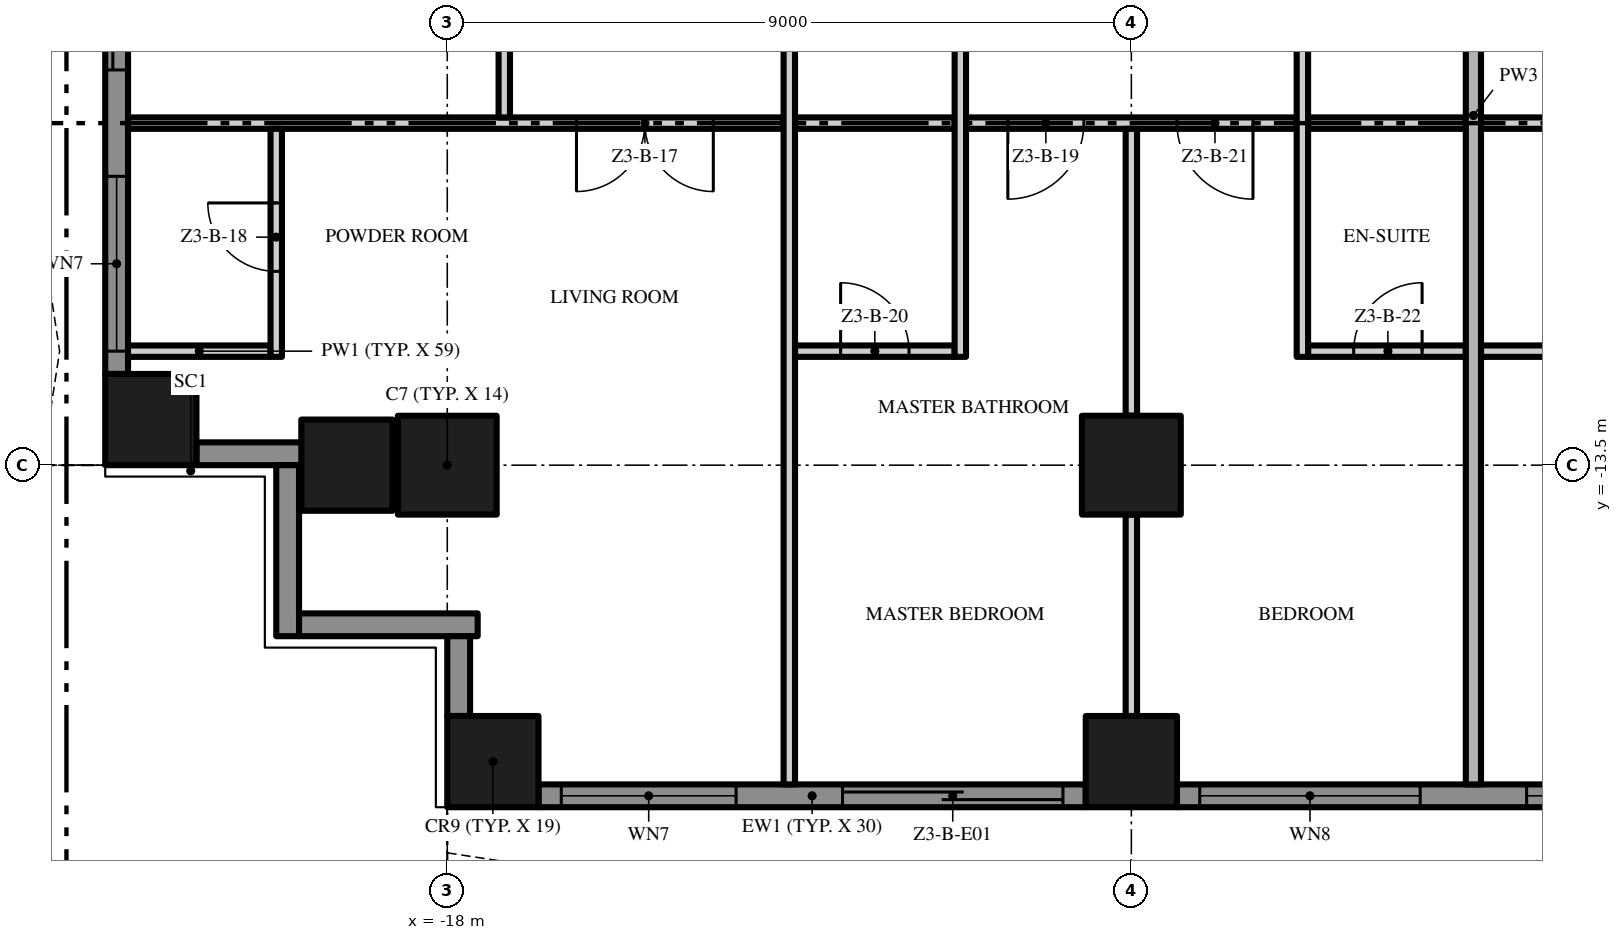
"""IFC4 building model, lengths in metres.
Left out: names, types, materials, properties, quantities, classifications, styles, units other than length and angle.
Written with IfcOpenShell. Run it as: python <this file> out.ifc"""

import sys

from ifc_helpers import new_model, si_unit, direction, frame, frame_2d, origin, origin_2d, place, context, subcontext, project, spatial, polyline, rectangle, outline, extrude, element, fill, save


model = new_model("IFC4")
c1 = context("Model", 3, precision=1e-05, world=origin(), true_north=direction((0.0, 1.0)))
c2 = subcontext(c1, "Body", "Model", "MODEL_VIEW")
j1 = project(units=[si_unit("LENGTHUNIT", "METRE"), si_unit("PLANEANGLEUNIT", "RADIAN")], contexts=[c1])
p1 = place(None, origin())
s1 = spatial("IfcSite", under=j1, at=p1, CompositionType="ELEMENT")
p2 = place(p1, origin())
s2 = spatial("IfcBuilding", under=s1, at=p2, CompositionType="ELEMENT")
p3 = place(p2, frame((0.0, 0.0, 136.4)))
s3 = spatial("IfcBuildingStorey", under=s2, at=p3, CompositionType="ELEMENT", Elevation=136.4)
p4 = place(p3, frame((-18.0, -13.5, 0.0), z_axis=(0.0, 0.0, 1.0), x_axis=(1.0, 0.0, 0.0)))
e1 = element("IfcColumn", 1, at=p4, inside=s3, PredefinedType="COLUMN", context=c2, shape_type="SweptSolid", body=[
    extrude(rectangle(XDim=1.3, YDim=1.3, at=origin_2d()), origin(), (0.0, 0.0, 1.0), 3.5),
])
for number, where, z_axis, x_axis in (
    (2, (-17.4, -17.4, 0.0), (0.0, 0.0, 1.0), (1.0, 0.0, 0.0)),
    (3, (-21.9, -12.9, 0.0), (0.0, 0.0, 1.0), (1.0, 0.0, 0.0)),
    (4, (-19.32, -13.5, 0.0), (0.0, 0.0, 1.0), (1.0, 0.0, 0.0)),
):
    element("IfcColumn", number, at=place(p3, frame(where, z_axis=z_axis, x_axis=x_axis)), inside=s3, PredefinedType="COLUMN", context=c2, shape_type="SweptSolid", body=[
        extrude(rectangle(XDim=1.2, YDim=1.2, at=origin_2d()), origin(), (0.0, 0.0, 1.0), 3.5),
    ])
p5 = place(p3, frame((-9.0, -13.5, 0.0), z_axis=(0.0, 0.0, 1.0), x_axis=(1.0, 0.0, 0.0)))
e5 = element("IfcColumn", 5, at=p5, inside=s3, PredefinedType="COLUMN", context=c2, shape_type="SweptSolid", body=[
    extrude(rectangle(XDim=1.3, YDim=1.3, at=origin_2d()), origin(), (0.0, 0.0, 1.0), 3.5),
])
p6 = place(p3, frame((-9.0, -17.4, 0.0), z_axis=(0.0, 0.0, 1.0), x_axis=(1.0, 0.0, 0.0)))
e6 = element("IfcColumn", 6, at=p6, inside=s3, PredefinedType="COLUMN", context=c2, shape_type="SweptSolid", body=[
    extrude(rectangle(XDim=1.2, YDim=1.2, at=origin_2d()), origin(), (0.0, 0.0, 1.0), 3.5),
])
p7 = place(p3, frame((-9.6, -17.85, 0.0), z_axis=(0.0, 0.0, 1.0), x_axis=(-1.0, 0.0, 0.0)))
e7 = element("IfcWall", 7, at=p7, inside=s3, PredefinedType="SOLIDWALL", context=c2, shape_type="SweptSolid", body=[
    extrude(rectangle(XDim=7.2, YDim=0.3, at=frame_2d((3.6, 0.0))), origin(), (0.0, 0.0, 1.0), 3.5),
])
p8 = place(p7, frame((4.6, 0.0, 0.45)))
e8 = element("IfcOpeningElement", 8, at=p8, cuts=e7, PredefinedType="OPENING", context=c2, shape_type="SweptSolid", body=[
    extrude(rectangle(XDim=2.3, YDim=2.65, at=frame_2d((1.15, 1.325))), frame((0.0, 0.16, 0.0), z_axis=(0.0, -1.0, 0.0), x_axis=(1.0, 0.0, 0.0)), (0.0, 0.0, 1.0), 0.32),
])
p9 = place(p7, frame((0.3, 0.0, 0.0)))
e9 = element("IfcOpeningElement", 9, at=p9, cuts=e7, PredefinedType="OPENING", context=c2, shape_type="SweptSolid", body=[
    extrude(rectangle(XDim=2.9, YDim=2.4, at=frame_2d((1.45, 1.2))), frame((0.0, 0.16, 0.0), z_axis=(0.0, -1.0, 0.0), x_axis=(1.0, 0.0, 0.0)), (0.0, 0.0, 1.0), 0.32),
])
p10 = place(p3, frame((-0.6, -17.85, 0.0), z_axis=(0.0, 0.0, 1.0), x_axis=(-1.0, 0.0, 0.0)))
e10 = element("IfcWall", 10, at=p10, inside=s3, PredefinedType="SOLIDWALL", context=c2, shape_type="SweptSolid", body=[
    extrude(rectangle(XDim=7.8, YDim=0.3, at=frame_2d((3.9, 0.0))), origin(), (0.0, 0.0, 1.0), 3.5),
])
p11 = place(p10, frame((4.6, 0.0, 0.45)))
e11 = element("IfcOpeningElement", 11, at=p11, cuts=e10, PredefinedType="OPENING", context=c2, shape_type="SweptSolid", body=[
    extrude(rectangle(XDim=2.9, YDim=2.65, at=frame_2d((1.45, 1.325))), frame((0.0, 0.16, 0.0), z_axis=(0.0, -1.0, 0.0), x_axis=(1.0, 0.0, 0.0)), (0.0, 0.0, 1.0), 0.32),
])
p12 = place(p10, frame((0.3, 0.0, 0.45)))
e12 = element("IfcOpeningElement", 12, at=p12, cuts=e10, PredefinedType="OPENING", context=c2, shape_type="SweptSolid", body=[
    extrude(rectangle(XDim=2.9, YDim=2.65, at=frame_2d((1.45, 1.325))), frame((0.0, 0.16, 0.0), z_axis=(0.0, -1.0, 0.0), x_axis=(1.0, 0.0, 0.0)), (0.0, 0.0, 1.0), 0.32),
])
p13 = place(p3, frame((-22.35, -12.3, 0.0), z_axis=(0.0, 0.0, 1.0), x_axis=(0.0, 1.0, 0.0)))
e13 = element("IfcWall", 13, at=p13, inside=s3, PredefinedType="SOLIDWALL", context=c2, shape_type="SweptSolid", body=[
    extrude(rectangle(XDim=7.2, YDim=0.3, at=frame_2d((3.6, 0.0))), origin(), (0.0, 0.0, 1.0), 3.5),
])
p14 = place(p13, frame((4.0, 0.0, 0.0)))
e14 = element("IfcOpeningElement", 14, at=p14, cuts=e13, PredefinedType="OPENING", context=c2, shape_type="SweptSolid", body=[
    extrude(rectangle(XDim=2.9, YDim=2.4, at=frame_2d((1.45, 1.2))), frame((0.0, 0.16, 0.0), z_axis=(0.0, -1.0, 0.0), x_axis=(1.0, 0.0, 0.0)), (0.0, 0.0, 1.0), 0.32),
])
p15 = place(p13, frame((0.3, 0.0, 0.45)))
e15 = element("IfcOpeningElement", 15, at=p15, cuts=e13, PredefinedType="OPENING", context=c2, shape_type="SweptSolid", body=[
    extrude(rectangle(XDim=2.3, YDim=2.65, at=frame_2d((1.15, 1.325))), frame((0.0, 0.16, 0.0), z_axis=(0.0, -1.0, 0.0), x_axis=(1.0, 0.0, 0.0)), (0.0, 0.0, 1.0), 0.32),
])
p16 = place(p3, frame((-19.85, -13.35, 0.0), z_axis=(0.0, 0.0, 1.0), x_axis=(-1.0, 0.0, 0.0)))
e16 = element("IfcWall", 16, at=p16, inside=s3, PredefinedType="SOLIDWALL", context=c2, shape_type="SweptSolid", body=[
    extrude(rectangle(XDim=1.45, YDim=0.3, at=frame_2d((0.725, 0.0))), origin(), (0.0, 0.0, 1.0), 3.5),
])
p17 = place(p3, frame((-20.1, -15.75, 0.0), z_axis=(0.0, 0.0, 1.0), x_axis=(0.0, 1.0, 0.0)))
e17 = element("IfcWall", 17, at=p17, inside=s3, PredefinedType="SOLIDWALL", context=c2, shape_type="SweptSolid", body=[
    extrude(rectangle(XDim=2.25, YDim=0.3, at=frame_2d((1.125, 0.0))), origin(), (0.0, 0.0, 1.0), 3.5),
])
p18 = place(p3, frame((-17.6, -15.6, 0.0), z_axis=(0.0, 0.0, 1.0), x_axis=(-1.0, 0.0, 0.0)))
e18 = element("IfcWall", 18, at=p18, inside=s3, PredefinedType="SOLIDWALL", context=c2, shape_type="SweptSolid", body=[
    extrude(rectangle(XDim=2.35, YDim=0.3, at=frame_2d((1.175, 0.0))), origin(), (0.0, 0.0, 1.0), 3.5),
])
p19 = place(p3, frame((-17.85, -16.8, 0.0), z_axis=(0.0, 0.0, 1.0), x_axis=(0.0, 1.0, 0.0)))
e19 = element("IfcWall", 19, at=p19, inside=s3, PredefinedType="SOLIDWALL", context=c2, shape_type="SweptSolid", body=[
    extrude(rectangle(XDim=1.05, YDim=0.3, at=frame_2d((0.525, 0.0))), origin(), (0.0, 0.0, 1.0), 3.5),
])
p20 = place(p3, origin())
e20 = element("IfcWall", 20, at=p20, inside=s3, PredefinedType="USERDEFINED", context=c2, shape_type="SweptSolid", body=[
    extrude(outline(polyline([(-18.0, -18.6), (-16.5, -18.829), (-15.0, -19.429), (-13.5, -20.171), (-12.0, -20.771), (-10.5, -21.0), (-9.0, -20.771), (-7.5, -20.171), (-6.0, -19.429), (-4.5, -18.829), (-3.0, -18.6), (-1.5, -18.829), (0.0, -19.429), (1.5, -20.171), (3.0, -20.771), (4.5, -21.0), (6.0, -20.771), (7.5, -20.171), (9.0, -19.429), (10.5, -18.829), (12.0, -18.6), (13.5, -18.829), (15.0, -19.429), (16.5, -20.171), (18.0, -20.771), (18.093, -20.539), (16.602, -19.942), (15.102, -19.201), (13.566, -18.586), (12.0, -18.347), (10.434, -18.586), (8.898, -19.201), (7.398, -19.942), (5.934, -20.528), (4.5, -20.747), (3.066, -20.528), (1.602, -19.942), (0.102, -19.201), (-1.434, -18.586), (-3.0, -18.347), (-4.566, -18.586), (-6.102, -19.201), (-7.602, -19.942), (-9.066, -20.528), (-10.5, -20.747), (-11.934, -20.528), (-13.398, -19.942), (-14.898, -19.201), (-16.434, -18.586), (-17.962, -18.353), (-18.0, -18.6)])), origin(), (0.0, 0.0, 1.0), 0.9),
])
p21 = place(p3, origin())
e21 = element("IfcWall", 21, at=p21, inside=s3, PredefinedType="USERDEFINED", context=c2, shape_type="SweptSolid", body=[
    extrude(outline(polyline([(-23.1, 18.0), (-23.329, 16.5), (-23.929, 15.0), (-24.671, 13.5), (-25.271, 12.0), (-25.5, 10.5), (-25.271, 9.0), (-24.671, 7.5), (-23.929, 6.0), (-23.329, 4.5), (-23.1, 3.0), (-23.329, 1.5), (-23.929, 0.0), (-24.671, -1.5), (-25.271, -3.0), (-25.5, -4.5), (-25.271, -6.0), (-24.671, -7.5), (-23.929, -9.0), (-23.329, -10.5), (-23.1, -12.0), (-23.329, -13.5), (-23.082, -13.538), (-22.847, -12.0), (-23.086, -10.434), (-23.701, -8.898), (-24.442, -7.398), (-25.028, -5.934), (-25.247, -4.5), (-25.028, -3.066), (-24.442, -1.602), (-23.701, -0.102), (-23.086, 1.434), (-22.847, 3.0), (-23.086, 4.566), (-23.701, 6.102), (-24.442, 7.602), (-25.028, 9.066), (-25.247, 10.5), (-25.028, 11.934), (-24.442, 13.398), (-23.701, 14.898), (-23.086, 16.434), (-22.853, 17.962), (-23.1, 18.0)])), origin(), (0.0, 0.0, 1.0), 0.9),
])
p22 = place(p3, frame((-22.2, -12.0, 0.0), z_axis=(0.0, 0.0, 1.0), x_axis=(1.0, 0.0, 0.0)))
e22 = element("IfcWall", 22, at=p22, inside=s3, PredefinedType="PARTITIONING", context=c2, shape_type="SweptSolid", body=[
    extrude(rectangle(XDim=1.875, YDim=0.15, at=frame_2d((0.938, 0.0))), origin(), (0.0, 0.0, 1.0), 3.5),
])
p23 = place(p3, frame((-13.425, -12.0, 0.0), z_axis=(0.0, 0.0, 1.0), x_axis=(1.0, 0.0, 0.0)))
e23 = element("IfcWall", 23, at=p23, inside=s3, PredefinedType="PARTITIONING", context=c2, shape_type="SweptSolid", body=[
    extrude(rectangle(XDim=2.1, YDim=0.15, at=frame_2d((1.05, 0.0))), origin(), (0.0, 0.0, 1.0), 3.5),
])
p24 = place(p23, frame((0.6, 0.0, 0.0)))
e24 = element("IfcOpeningElement", 24, at=p24, cuts=e23, PredefinedType="OPENING", context=c2, shape_type="SweptSolid", body=[
    extrude(rectangle(XDim=0.9, YDim=2.1, at=frame_2d((0.45, 1.05))), frame((0.0, 0.085, 0.0), z_axis=(0.0, -1.0, 0.0), x_axis=(1.0, 0.0, 0.0)), (0.0, 0.0, 1.0), 0.17),
])
p25 = place(p3, frame((-6.675, -12.0, 0.0), z_axis=(0.0, 0.0, 1.0), x_axis=(1.0, 0.0, 0.0)))
e25 = element("IfcWall", 25, at=p25, inside=s3, PredefinedType="PARTITIONING", context=c2, shape_type="SweptSolid", body=[
    extrude(rectangle(XDim=2.075, YDim=0.15, at=frame_2d((1.038, 0.0))), origin(), (0.0, 0.0, 1.0), 3.5),
])
p26 = place(p25, frame((0.6, 0.0, 0.0)))
e26 = element("IfcOpeningElement", 26, at=p26, cuts=e25, PredefinedType="OPENING", context=c2, shape_type="SweptSolid", body=[
    extrude(rectangle(XDim=0.9, YDim=2.1, at=frame_2d((0.45, 1.05))), frame((0.0, 0.085, 0.0), z_axis=(0.0, -1.0, 0.0), x_axis=(1.0, 0.0, 0.0)), (0.0, 0.0, 1.0), 0.17),
])
p27 = place(p3, frame((-4.4, -12.0, 0.0), z_axis=(0.0, 0.0, 1.0), x_axis=(1.0, 0.0, 0.0)))
e27 = element("IfcWall", 27, at=p27, inside=s3, PredefinedType="PARTITIONING", context=c2, shape_type="SweptSolid", body=[
    extrude(rectangle(XDim=2.075, YDim=0.15, at=frame_2d((1.038, 0.0))), origin(), (0.0, 0.0, 1.0), 3.5),
])
p28 = place(p3, frame((-13.575, -9.0, 0.0), z_axis=(0.0, 0.0, 1.0), x_axis=(-1.0, 0.0, 0.0)))
e28 = element("IfcWall", 28, at=p28, inside=s3, PredefinedType="PARTITIONING", context=c2, shape_type="SweptSolid", body=[
    extrude(rectangle(XDim=8.625, YDim=0.15, at=frame_2d((4.312, 0.0))), origin(), (0.0, 0.0, 1.0), 3.5),
])
p29 = place(p28, frame((0.925, 0.0, 0.0)))
e29 = element("IfcOpeningElement", 29, at=p29, cuts=e28, PredefinedType="OPENING", context=c2, shape_type="SweptSolid", body=[
    extrude(rectangle(XDim=1.8, YDim=2.4, at=frame_2d((0.9, 1.2))), frame((0.0, 0.085, 0.0), z_axis=(0.0, -1.0, 0.0), x_axis=(1.0, 0.0, 0.0)), (0.0, 0.0, 1.0), 0.17),
])
p30 = place(p3, frame((-13.425, -9.0, 0.0), z_axis=(0.0, 0.0, 1.0), x_axis=(1.0, 0.0, 0.0)))
e30 = element("IfcWall", 30, at=p30, inside=s3, PredefinedType="PARTITIONING", context=c2, shape_type="SweptSolid", body=[
    extrude(rectangle(XDim=2.1, YDim=0.15, at=frame_2d((1.05, 0.0))), origin(), (0.0, 0.0, 1.0), 3.5),
])
p31 = place(p3, frame((-6.825, -9.0, 0.0), z_axis=(0.0, 0.0, 1.0), x_axis=(-1.0, 0.0, 0.0)))
e31 = element("IfcWall", 31, at=p31, inside=s3, PredefinedType="PARTITIONING", context=c2, shape_type="SweptSolid", body=[
    extrude(rectangle(XDim=4.35, YDim=0.15, at=frame_2d((2.175, 0.0))), origin(), (0.0, 0.0, 1.0), 3.5),
])
p32 = place(p31, frame((2.8, 0.0, 0.0)))
e32 = element("IfcOpeningElement", 32, at=p32, cuts=e31, PredefinedType="OPENING", context=c2, shape_type="SweptSolid", body=[
    extrude(rectangle(XDim=1.0, YDim=2.4, at=frame_2d((0.5, 1.2))), frame((0.0, 0.085, 0.0), z_axis=(0.0, -1.0, 0.0), x_axis=(1.0, 0.0, 0.0)), (0.0, 0.0, 1.0), 0.17),
])
p33 = place(p31, frame((0.575, 0.0, 0.0)))
e33 = element("IfcOpeningElement", 33, at=p33, cuts=e31, PredefinedType="OPENING", context=c2, shape_type="SweptSolid", body=[
    extrude(rectangle(XDim=1.0, YDim=2.4, at=frame_2d((0.5, 1.2))), frame((0.0, 0.085, 0.0), z_axis=(0.0, -1.0, 0.0), x_axis=(1.0, 0.0, 0.0)), (0.0, 0.0, 1.0), 0.17),
])
for number, where, z_axis, x_axis in (
    (34, (-6.675, -9.0, 0.0), (0.0, 0.0, 1.0), (1.0, 0.0, 0.0)),
    (35, (-4.4, -9.0, 0.0), (0.0, 0.0, 1.0), (1.0, 0.0, 0.0)),
):
    element("IfcWall", number, at=place(p3, frame(where, z_axis=z_axis, x_axis=x_axis)), inside=s3, PredefinedType="PARTITIONING", context=c2, shape_type="SweptSolid", body=[
        extrude(rectangle(XDim=2.075, YDim=0.15, at=frame_2d((1.038, 0.0))), origin(), (0.0, 0.0, 1.0), 3.5),
    ])
p34 = place(p3, frame((-20.25, -12.075, 0.0), z_axis=(0.0, 0.0, 1.0), x_axis=(0.0, 1.0, 0.0)))
e36 = element("IfcWall", 36, at=p34, inside=s3, PredefinedType="PARTITIONING", context=c2, shape_type="SweptSolid", body=[
    extrude(rectangle(XDim=3.0, YDim=0.15, at=frame_2d((1.5, 0.0))), origin(), (0.0, 0.0, 1.0), 3.5),
])
p35 = place(p34, frame((1.125, 0.0, 0.0)))
e37 = element("IfcOpeningElement", 37, at=p35, cuts=e36, PredefinedType="OPENING", context=c2, shape_type="SweptSolid", body=[
    extrude(rectangle(XDim=0.9, YDim=2.1, at=frame_2d((0.45, 1.05))), frame((0.0, 0.085, 0.0), z_axis=(0.0, -1.0, 0.0), x_axis=(1.0, 0.0, 0.0)), (0.0, 0.0, 1.0), 0.17),
])
p36 = place(p3, frame((-17.25, -8.925, 0.0), z_axis=(0.0, 0.0, 1.0), x_axis=(0.0, 1.0, 0.0)))
e38 = element("IfcWall", 38, at=p36, inside=s3, PredefinedType="PARTITIONING", context=c2, shape_type="SweptSolid", body=[
    extrude(rectangle(XDim=4.5, YDim=0.15, at=frame_2d((2.25, 0.0))), origin(), (0.0, 0.0, 1.0), 3.5),
])
p37 = place(p3, frame((-13.5, -4.425, 0.0), z_axis=(0.0, 0.0, 1.0), x_axis=(0.0, -1.0, 0.0)))
e39 = element("IfcWall", 39, at=p37, inside=s3, PredefinedType="PARTITIONING", context=c2, shape_type="SweptSolid", body=[
    extrude(rectangle(XDim=13.275, YDim=0.15, at=frame_2d((6.638, 0.0))), origin(), (0.0, 0.0, 1.0), 3.5),
])
p38 = place(p37, frame((1.875, 0.0, 0.0)))
e40 = element("IfcOpeningElement", 40, at=p38, cuts=e39, PredefinedType="OPENING", context=c2, shape_type="SweptSolid", body=[
    extrude(rectangle(XDim=0.9, YDim=2.1, at=frame_2d((0.45, 1.05))), frame((0.0, 0.085, 0.0), z_axis=(0.0, -1.0, 0.0), x_axis=(1.0, 0.0, 0.0)), (0.0, 0.0, 1.0), 0.17),
])
p39 = place(p3, frame((-11.25, -12.075, 0.0), z_axis=(0.0, 0.0, 1.0), x_axis=(0.0, 1.0, 0.0)))
e41 = element("IfcWall", 41, at=p39, inside=s3, PredefinedType="PARTITIONING", context=c2, shape_type="SweptSolid", body=[
    extrude(rectangle(XDim=7.65, YDim=0.15, at=frame_2d((3.825, 0.0))), origin(), (0.0, 0.0, 1.0), 3.5),
])
p40 = place(p3, frame((-9.0, -16.8, 0.0), z_axis=(0.0, 0.0, 1.0), x_axis=(0.0, 1.0, 0.0)))
e42 = element("IfcWall", 42, at=p40, inside=s3, PredefinedType="PARTITIONING", context=c2, shape_type="SweptSolid", body=[
    extrude(rectangle(XDim=2.65, YDim=0.15, at=frame_2d((1.325, 0.0))), origin(), (0.0, 0.0, 1.0), 3.5),
])
p41 = place(p3, frame((-9.0, -12.85, 0.0), z_axis=(0.0, 0.0, 1.0), x_axis=(0.0, 1.0, 0.0)))
e43 = element("IfcWall", 43, at=p41, inside=s3, PredefinedType="PARTITIONING", context=c2, shape_type="SweptSolid", body=[
    extrude(rectangle(XDim=3.775, YDim=0.15, at=frame_2d((1.887, 0.0))), origin(), (0.0, 0.0, 1.0), 3.5),
])
p42 = place(p3, frame((-6.75, -12.075, 0.0), z_axis=(0.0, 0.0, 1.0), x_axis=(0.0, 1.0, 0.0)))
e44 = element("IfcWall", 44, at=p42, inside=s3, PredefinedType="PARTITIONING", context=c2, shape_type="SweptSolid", body=[
    extrude(rectangle(XDim=7.65, YDim=0.15, at=frame_2d((3.825, 0.0))), origin(), (0.0, 0.0, 1.0), 3.5),
])
p43 = place(p3, frame((-4.5, -17.7, 0.0), z_axis=(0.0, 0.0, 1.0), x_axis=(0.0, 1.0, 0.0)))
e45 = element("IfcWall", 45, at=p43, inside=s3, PredefinedType="PARTITIONING", context=c2, shape_type="SweptSolid", body=[
    extrude(rectangle(XDim=17.6, YDim=0.2, at=frame_2d((8.8, 0.0))), origin(), (0.0, 0.0, 1.0), 3.5),
])
p44 = place(p8, origin())
e46 = element("IfcWindow", 46, at=p44, inside=s3, PartitioningType="SINGLE_PANEL", PredefinedType="WINDOW", context=c2, shape_type="SweptSolid", body=[
    extrude(rectangle(XDim=2.3, YDim=2.65, at=frame_2d((1.15, 1.325))), frame((0.0, 0.03, 0.0), z_axis=(0.0, -1.0, 0.0), x_axis=(1.0, 0.0, 0.0)), (0.0, 0.0, 1.0), 0.06),
])
fill(e8, e46)
p45 = place(p9, origin())
e47 = element("IfcDoor", 47, at=p45, inside=s3, OperationType="SINGLE_SWING_LEFT", PredefinedType="DOOR", context=c2, shape_type="SweptSolid", body=[
    extrude(rectangle(XDim=2.9, YDim=2.4, at=frame_2d((1.45, 1.2))), frame((0.0, 0.025, 0.0), z_axis=(0.0, -1.0, 0.0), x_axis=(1.0, 0.0, 0.0)), (0.0, 0.0, 1.0), 0.05),
])
fill(e9, e47)
p46 = place(p11, origin())
e48 = element("IfcWindow", 48, at=p46, inside=s3, PartitioningType="SINGLE_PANEL", PredefinedType="WINDOW", context=c2, shape_type="SweptSolid", body=[
    extrude(rectangle(XDim=2.9, YDim=2.65, at=frame_2d((1.45, 1.325))), frame((0.0, 0.03, 0.0), z_axis=(0.0, -1.0, 0.0), x_axis=(1.0, 0.0, 0.0)), (0.0, 0.0, 1.0), 0.06),
])
fill(e11, e48)
p47 = place(p12, origin())
e49 = element("IfcWindow", 49, at=p47, inside=s3, PartitioningType="SINGLE_PANEL", PredefinedType="WINDOW", context=c2, shape_type="SweptSolid", body=[
    extrude(rectangle(XDim=2.9, YDim=2.65, at=frame_2d((1.45, 1.325))), frame((0.0, 0.03, 0.0), z_axis=(0.0, -1.0, 0.0), x_axis=(1.0, 0.0, 0.0)), (0.0, 0.0, 1.0), 0.06),
])
fill(e12, e49)
p48 = place(p14, origin())
e50 = element("IfcDoor", 50, at=p48, inside=s3, OperationType="SINGLE_SWING_LEFT", PredefinedType="DOOR", context=c2, shape_type="SweptSolid", body=[
    extrude(rectangle(XDim=2.9, YDim=2.4, at=frame_2d((1.45, 1.2))), frame((0.0, 0.025, 0.0), z_axis=(0.0, -1.0, 0.0), x_axis=(1.0, 0.0, 0.0)), (0.0, 0.0, 1.0), 0.05),
])
fill(e14, e50)
p49 = place(p15, origin())
e51 = element("IfcWindow", 51, at=p49, inside=s3, PartitioningType="SINGLE_PANEL", PredefinedType="WINDOW", context=c2, shape_type="SweptSolid", body=[
    extrude(rectangle(XDim=2.3, YDim=2.65, at=frame_2d((1.15, 1.325))), frame((0.0, 0.03, 0.0), z_axis=(0.0, -1.0, 0.0), x_axis=(1.0, 0.0, 0.0)), (0.0, 0.0, 1.0), 0.06),
])
fill(e15, e51)
p50 = place(p29, origin())
e52 = element("IfcDoor", 52, at=p50, inside=s3, OperationType="DOUBLE_DOOR_SINGLE_SWING", PredefinedType="DOOR", context=c2, shape_type="SweptSolid", body=[
    extrude(rectangle(XDim=1.8, YDim=2.4, at=frame_2d((0.9, 1.2))), frame((0.0, 0.025, 0.0), z_axis=(0.0, -1.0, 0.0), x_axis=(1.0, 0.0, 0.0)), (0.0, 0.0, 1.0), 0.05),
])
fill(e29, e52)
p51 = place(p35, origin())
e53 = element("IfcDoor", 53, at=p51, inside=s3, OperationType="SINGLE_SWING_RIGHT", PredefinedType="DOOR", context=c2, shape_type="SweptSolid", body=[
    extrude(rectangle(XDim=0.9, YDim=2.1, at=frame_2d((0.45, 1.05))), frame((0.0, 0.025, 0.0), z_axis=(0.0, -1.0, 0.0), x_axis=(1.0, 0.0, 0.0)), (0.0, 0.0, 1.0), 0.05),
])
fill(e37, e53)
p52 = place(p32, origin())
e54 = element("IfcDoor", 54, at=p52, inside=s3, OperationType="SINGLE_SWING_RIGHT", PredefinedType="DOOR", context=c2, shape_type="SweptSolid", body=[
    extrude(rectangle(XDim=1.0, YDim=2.4, at=frame_2d((0.5, 1.2))), frame((0.0, 0.025, 0.0), z_axis=(0.0, -1.0, 0.0), x_axis=(1.0, 0.0, 0.0)), (0.0, 0.0, 1.0), 0.05),
])
fill(e32, e54)
p53 = place(p24, origin())
e55 = element("IfcDoor", 55, at=p53, inside=s3, OperationType="SINGLE_SWING_LEFT", PredefinedType="DOOR", context=c2, shape_type="SweptSolid", body=[
    extrude(rectangle(XDim=0.9, YDim=2.1, at=frame_2d((0.45, 1.05))), frame((0.0, 0.025, 0.0), z_axis=(0.0, -1.0, 0.0), x_axis=(1.0, 0.0, 0.0)), (0.0, 0.0, 1.0), 0.05),
])
fill(e24, e55)
p54 = place(p33, origin())
e56 = element("IfcDoor", 56, at=p54, inside=s3, OperationType="SINGLE_SWING_LEFT", PredefinedType="DOOR", context=c2, shape_type="SweptSolid", body=[
    extrude(rectangle(XDim=1.0, YDim=2.4, at=frame_2d((0.5, 1.2))), frame((0.0, 0.025, 0.0), z_axis=(0.0, -1.0, 0.0), x_axis=(1.0, 0.0, 0.0)), (0.0, 0.0, 1.0), 0.05),
])
fill(e33, e56)
p55 = place(p26, origin())
e57 = element("IfcDoor", 57, at=p55, inside=s3, OperationType="SINGLE_SWING_RIGHT", PredefinedType="DOOR", context=c2, shape_type="SweptSolid", body=[
    extrude(rectangle(XDim=0.9, YDim=2.1, at=frame_2d((0.45, 1.05))), frame((0.0, 0.025, 0.0), z_axis=(0.0, -1.0, 0.0), x_axis=(1.0, 0.0, 0.0)), (0.0, 0.0, 1.0), 0.05),
])
fill(e26, e57)
save(model, sys.argv[1])
